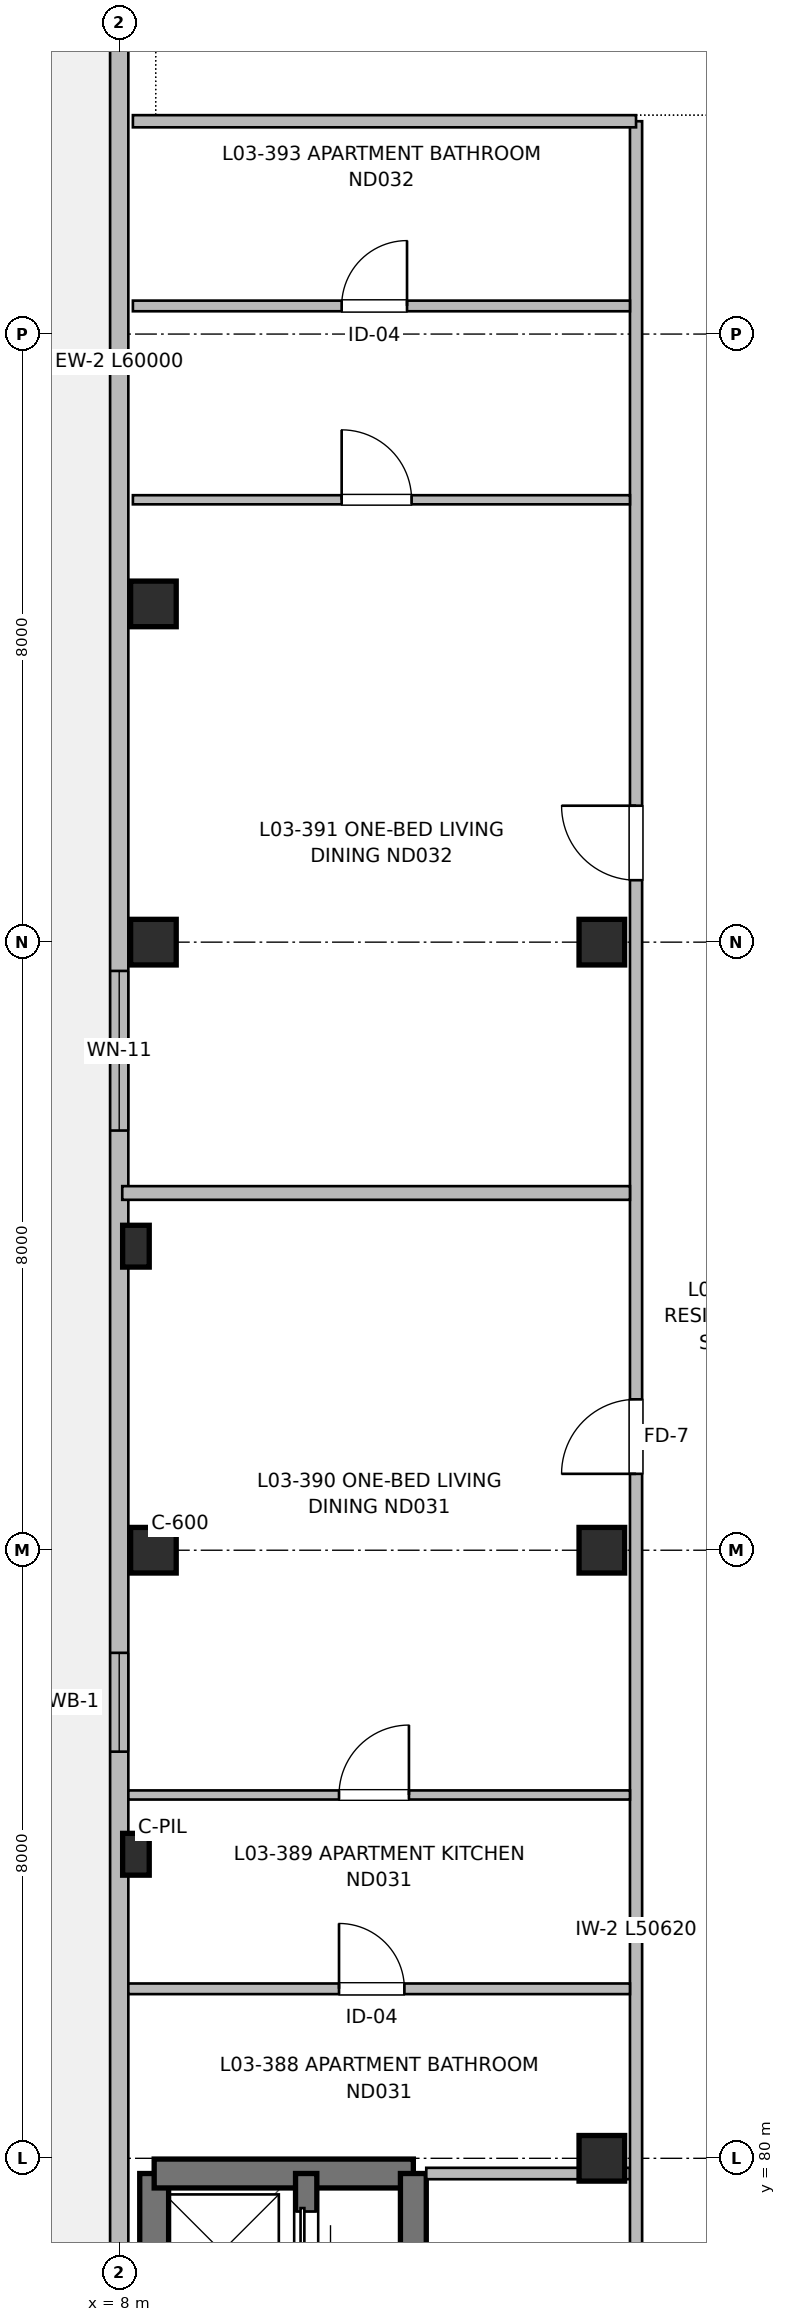
"""IFC4 building model, lengths in metres.
Left out: names, types, materials, properties, quantities, classifications, styles, units other than length and angle.
Written with IfcOpenShell. Run it as: python <this file> out.ifc"""

import sys

from ifc_helpers import new_model, si_unit, direction, frame, frame_2d, origin, origin_2d, place, context, subcontext, project, spatial, rectangle, extrude, element, fill, save


model = new_model("IFC4")
c1 = context("Model", 3, precision=1e-05, world=origin(), true_north=direction((0.0, 1.0)))
c2 = subcontext(c1, "Body", "Model", "MODEL_VIEW")
j1 = project(units=[si_unit("LENGTHUNIT", "METRE"), si_unit("PLANEANGLEUNIT", "RADIAN")], contexts=[c1])
p1 = place(None, origin())
s1 = spatial("IfcSite", under=j1, at=p1, CompositionType="ELEMENT")
p2 = place(p1, origin())
s2 = spatial("IfcBuilding", under=s1, at=p2, CompositionType="ELEMENT")
p3 = place(p2, frame((0.0, 0.0, 10.56)))
s3 = spatial("IfcBuildingStorey", under=s2, at=p3, CompositionType="ELEMENT", Elevation=10.56)
for number, where, z_axis, x_axis in (
    (1, (8.22, 84.0, 0.0), (0.0, 0.0, 1.0), (1.0, 0.0, 0.0)),
    (2, (8.22, 92.0, 0.0), (0.0, 0.0, 1.0), (1.0, 0.0, 0.0)),
):
    element("IfcColumn", number, at=place(p3, frame(where, z_axis=z_axis, x_axis=x_axis)), inside=s3, PredefinedType="PILASTER", context=c2, shape_type="SweptSolid", body=[
        extrude(rectangle(XDim=0.35, YDim=0.55, at=origin_2d()), origin(), (0.0, 0.0, 1.0), 3.2),
    ])
for number, where, z_axis, x_axis in (
    (3, (8.45, 88.0, 0.0), (0.0, 0.0, 1.0), (1.0, 0.0, 0.0)),
    (4, (8.45, 96.0, 0.0), (0.0, 0.0, 1.0), (1.0, 0.0, 0.0)),
    (5, (8.45, 100.45, 0.0), (0.0, 0.0, 1.0), (1.0, 0.0, 0.0)),
    (6, (14.35, 80.0, 0.0), (0.0, 0.0, 1.0), (1.0, 0.0, 0.0)),
    (7, (14.35, 88.0, 0.0), (0.0, 0.0, 1.0), (1.0, 0.0, 0.0)),
    (8, (14.35, 96.0, 0.0), (0.0, 0.0, 1.0), (1.0, 0.0, 0.0)),
):
    element("IfcColumn", number, at=place(p3, frame(where, z_axis=z_axis, x_axis=x_axis)), inside=s3, PredefinedType="COLUMN", context=c2, shape_type="SweptSolid", body=[
        extrude(rectangle(XDim=0.6, YDim=0.6, at=origin_2d()), origin(), (0.0, 0.0, 1.0), 3.2),
    ])
p4 = place(p3, frame((8.46, 67.35, 0.0), z_axis=(0.0, 0.0, 1.0), x_axis=(0.0, 1.0, 0.0)))
e9 = element("IfcWall", 9, at=p4, inside=s3, PredefinedType="SHEAR", context=c2, shape_type="SweptSolid", body=[
    extrude(rectangle(XDim=12.45, YDim=0.38, at=frame_2d((6.225, 0.0))), origin(), (0.0, 0.0, 1.0), 3.2),
])
p5 = place(p4, frame((2.2, 0.0, 0.97)))
e10 = element("IfcOpeningElement", 10, at=p5, cuts=e9, PredefinedType="OPENING", context=c2, shape_type="SweptSolid", body=[
    extrude(rectangle(XDim=0.95, YDim=1.25, at=frame_2d((0.475, 0.625))), frame((0.0, 0.2, 0.0), z_axis=(0.0, -1.0, 0.0), x_axis=(1.0, 0.0, 0.0)), (0.0, 0.0, 1.0), 0.4),
])
p6 = place(p3, frame((8.46, 79.8, 0.0), z_axis=(0.0, 0.0, 1.0), x_axis=(1.0, 0.0, 0.0)))
e11 = element("IfcWall", 11, at=p6, inside=s3, PredefinedType="SHEAR", context=c2, shape_type="SweptSolid", body=[
    extrude(rectangle(XDim=3.41, YDim=0.38, at=frame_2d((1.705, 0.0))), origin(), (0.0, 0.0, 1.0), 3.2),
])
p7 = place(p3, frame((11.87, 79.8, 0.0), z_axis=(0.0, 0.0, 1.0), x_axis=(0.0, -1.0, 0.0)))
e12 = element("IfcWall", 12, at=p7, inside=s3, PredefinedType="SHEAR", context=c2, shape_type="SweptSolid", body=[
    extrude(rectangle(XDim=12.45, YDim=0.34, at=frame_2d((6.225, 0.0))), origin(), (0.0, 0.0, 1.0), 3.2),
])
p8 = place(p7, frame((10.85, 0.0, 0.0)))
e13 = element("IfcOpeningElement", 13, at=p8, cuts=e12, PredefinedType="OPENING", context=c2, shape_type="SweptSolid", body=[
    extrude(rectangle(XDim=1.05, YDim=2.15, at=frame_2d((0.525, 1.075))), frame((0.0, 0.18, 0.0), z_axis=(0.0, -1.0, 0.0), x_axis=(1.0, 0.0, 0.0)), (0.0, 0.0, 1.0), 0.36),
])
p9 = place(p3, frame((10.46, 74.55, 0.0), z_axis=(0.0, 0.0, 1.0), x_axis=(0.0, 1.0, 0.0)))
e14 = element("IfcWall", 14, at=p9, inside=s3, PredefinedType="SHEAR", context=c2, shape_type="SweptSolid", body=[
    extrude(rectangle(XDim=5.25, YDim=0.28, at=frame_2d((2.625, 0.0))), origin(), (0.0, 0.0, 1.0), 3.2),
])
p10 = place(p9, frame((1.15, 0.0, 0.0)))
e15 = element("IfcOpeningElement", 15, at=p10, cuts=e14, PredefinedType="OPENING", context=c2, shape_type="SweptSolid", body=[
    extrude(rectangle(XDim=1.0, YDim=2.15, at=frame_2d((0.5, 1.075))), frame((0.0, 0.15, 0.0), z_axis=(0.0, -1.0, 0.0), x_axis=(1.0, 0.0, 0.0)), (0.0, 0.0, 1.0), 0.3),
])
p11 = place(p9, frame((3.85, 0.0, 0.0)))
e16 = element("IfcOpeningElement", 16, at=p11, cuts=e14, PredefinedType="OPENING", context=c2, shape_type="SweptSolid", body=[
    extrude(rectangle(XDim=0.9, YDim=2.15, at=frame_2d((0.45, 1.075))), frame((0.0, 0.15, 0.0), z_axis=(0.0, -1.0, 0.0), x_axis=(1.0, 0.0, 0.0)), (0.0, 0.0, 1.0), 0.3),
])
p12 = place(p3, frame((8.0, 56.0, 0.0), z_axis=(0.0, 0.0, 1.0), x_axis=(0.0, 1.0, 0.0)))
e17 = element("IfcWall", 17, at=p12, inside=s3, PredefinedType="SOLIDWALL", context=c2, shape_type="SweptSolid", body=[
    extrude(rectangle(XDim=60.0, YDim=0.24, at=frame_2d((30.0, 0.0))), origin(), (0.0, 0.0, 1.0), 2.98),
])
p13 = place(p12, frame((4.886, 0.0, 0.0)))
e18 = element("IfcOpeningElement", 18, at=p13, cuts=e17, PredefinedType="OPENING", context=c2, shape_type="SweptSolid", body=[
    extrude(rectangle(XDim=1.2, YDim=2.2, at=frame_2d((0.6, 1.1))), frame((0.0, 0.13, 0.0), z_axis=(0.0, -1.0, 0.0), x_axis=(1.0, 0.0, 0.0)), (0.0, 0.0, 1.0), 0.26),
])
p14 = place(p12, frame((12.157, 0.0, 0.87)))
e19 = element("IfcOpeningElement", 19, at=p14, cuts=e17, PredefinedType="OPENING", context=c2, shape_type="SweptSolid", body=[
    extrude(rectangle(XDim=1.4, YDim=1.35, at=frame_2d((0.7, 0.675))), frame((0.0, 0.13, 0.0), z_axis=(0.0, -1.0, 0.0), x_axis=(1.0, 0.0, 0.0)), (0.0, 0.0, 1.0), 0.26),
])
p15 = place(p12, frame((20.354, 0.0, 0.87)))
e20 = element("IfcOpeningElement", 20, at=p15, cuts=e17, PredefinedType="OPENING", context=c2, shape_type="SweptSolid", body=[
    extrude(rectangle(XDim=1.25, YDim=1.35, at=frame_2d((0.625, 0.675))), frame((0.0, 0.13, 0.0), z_axis=(0.0, -1.0, 0.0), x_axis=(1.0, 0.0, 0.0)), (0.0, 0.0, 1.0), 0.26),
])
p16 = place(p12, frame((29.35, 0.0, 0.82)))
e21 = element("IfcOpeningElement", 21, at=p16, cuts=e17, PredefinedType="OPENING", context=c2, shape_type="SweptSolid", body=[
    extrude(rectangle(XDim=1.3, YDim=1.4, at=frame_2d((0.65, 0.7))), frame((0.0, 0.13, 0.0), z_axis=(0.0, -1.0, 0.0), x_axis=(1.0, 0.0, 0.0)), (0.0, 0.0, 1.0), 0.26),
])
p17 = place(p12, frame((37.521, 0.0, 0.67)))
e22 = element("IfcOpeningElement", 22, at=p17, cuts=e17, PredefinedType="OPENING", context=c2, shape_type="SweptSolid", body=[
    extrude(rectangle(XDim=2.1, YDim=1.55, at=frame_2d((1.05, 0.775))), frame((0.0, 0.13, 0.0), z_axis=(0.0, -1.0, 0.0), x_axis=(1.0, 0.0, 0.0)), (0.0, 0.0, 1.0), 0.26),
])
p18 = place(p12, frame((55.639, 0.0, 0.9)))
e23 = element("IfcOpeningElement", 23, at=p18, cuts=e17, PredefinedType="OPENING", context=c2, shape_type="SweptSolid", body=[
    extrude(rectangle(XDim=1.05, YDim=1.15, at=frame_2d((0.525, 0.575))), frame((0.0, 0.13, 0.0), z_axis=(0.0, -1.0, 0.0), x_axis=(1.0, 0.0, 0.0)), (0.0, 0.0, 1.0), 0.26),
])
p19 = place(p3, frame((12.04, 79.8, 0.0), z_axis=(0.0, 0.0, 1.0), x_axis=(1.0, 0.0, 0.0)))
e24 = element("IfcWall", 24, at=p19, inside=s3, PredefinedType="PARTITIONING", context=c2, shape_type="SweptSolid", body=[
    extrude(rectangle(XDim=2.68, YDim=0.15, at=frame_2d((1.34, 0.0))), origin(), (0.0, 0.0, 1.0), 2.935),
])
p20 = place(p3, frame((14.8, 56.18, 0.0), z_axis=(0.0, 0.0, 1.0), x_axis=(0.0, 1.0, 0.0)))
e25 = element("IfcWall", 25, at=p20, inside=s3, PredefinedType="PARTITIONING", context=c2, shape_type="SweptSolid", body=[
    extrude(rectangle(XDim=50.62, YDim=0.16, at=frame_2d((25.31, 0.0))), origin(), (0.0, 0.0, 1.0), 2.935),
])
p21 = place(p20, frame((12.82, 0.0, 0.0)))
e26 = element("IfcOpeningElement", 26, at=p21, cuts=e25, PredefinedType="OPENING", context=c2, shape_type="SweptSolid", body=[
    extrude(rectangle(XDim=1.1, YDim=2.15, at=frame_2d((0.55, 1.075))), frame((0.0, 0.09, 0.0), z_axis=(0.0, -1.0, 0.0), x_axis=(1.0, 0.0, 0.0)), (0.0, 0.0, 1.0), 0.18),
])
p22 = place(p20, frame((19.22, 0.0, 0.0)))
e27 = element("IfcOpeningElement", 27, at=p22, cuts=e25, PredefinedType="OPENING", context=c2, shape_type="SweptSolid", body=[
    extrude(rectangle(XDim=1.6, YDim=2.15, at=frame_2d((0.8, 1.075))), frame((0.0, 0.09, 0.0), z_axis=(0.0, -1.0, 0.0), x_axis=(1.0, 0.0, 0.0)), (0.0, 0.0, 1.0), 0.18),
])
p23 = place(p20, frame((1.8, 0.0, 0.0)))
e28 = element("IfcOpeningElement", 28, at=p23, cuts=e25, PredefinedType="OPENING", context=c2, shape_type="SweptSolid", body=[
    extrude(rectangle(XDim=0.96, YDim=2.15, at=frame_2d((0.48, 1.075))), frame((0.0, 0.09, 0.0), z_axis=(0.0, -1.0, 0.0), x_axis=(1.0, 0.0, 0.0)), (0.0, 0.0, 1.0), 0.18),
])
p24 = place(p20, frame((32.825, 0.0, 0.0)))
e29 = element("IfcOpeningElement", 29, at=p24, cuts=e25, PredefinedType="OPENING", context=c2, shape_type="SweptSolid", body=[
    extrude(rectangle(XDim=0.98, YDim=2.15, at=frame_2d((0.49, 1.075))), frame((0.0, 0.09, 0.0), z_axis=(0.0, -1.0, 0.0), x_axis=(1.0, 0.0, 0.0)), (0.0, 0.0, 1.0), 0.18),
])
p25 = place(p20, frame((40.635, 0.0, 0.0)))
e30 = element("IfcOpeningElement", 30, at=p25, cuts=e25, PredefinedType="OPENING", context=c2, shape_type="SweptSolid", body=[
    extrude(rectangle(XDim=0.98, YDim=2.15, at=frame_2d((0.49, 1.075))), frame((0.0, 0.09, 0.0), z_axis=(0.0, -1.0, 0.0), x_axis=(1.0, 0.0, 0.0)), (0.0, 0.0, 1.0), 0.18),
])
p26 = place(p3, frame((8.18, 106.8, 0.0), z_axis=(0.0, 0.0, 1.0), x_axis=(1.0, 0.0, 0.0)))
e31 = element("IfcWall", 31, at=p26, inside=s3, PredefinedType="PARTITIONING", context=c2, shape_type="SweptSolid", body=[
    extrude(rectangle(XDim=6.62, YDim=0.16, at=frame_2d((3.31, 0.0))), origin(), (0.0, 0.0, 1.0), 2.935),
])
p27 = place(p3, frame((8.04, 92.7, 0.0), z_axis=(0.0, 0.0, 1.0), x_axis=(1.0, 0.0, 0.0)))
e32 = element("IfcWall", 32, at=p27, inside=s3, PredefinedType="PARTITIONING", context=c2, shape_type="SweptSolid", body=[
    extrude(rectangle(XDim=6.68, YDim=0.18, at=frame_2d((3.34, 0.0))), origin(), (0.0, 0.0, 1.0), 2.935),
])
p28 = place(p3, frame((8.12, 82.23, 0.0), z_axis=(0.0, 0.0, 1.0), x_axis=(1.0, 0.0, 0.0)))
e33 = element("IfcWall", 33, at=p28, inside=s3, PredefinedType="PARTITIONING", context=c2, shape_type="SweptSolid", body=[
    extrude(rectangle(XDim=6.6, YDim=0.14, at=frame_2d((3.3, 0.0))), origin(), (0.0, 0.0, 1.0), 2.935),
])
p29 = place(p28, frame((2.772, 0.0, 0.0)))
e34 = element("IfcOpeningElement", 34, at=p29, cuts=e33, PredefinedType="OPENING", context=c2, shape_type="SweptSolid", body=[
    extrude(rectangle(XDim=0.86, YDim=2.1, at=frame_2d((0.43, 1.05))), frame((0.0, 0.08, 0.0), z_axis=(0.0, -1.0, 0.0), x_axis=(1.0, 0.0, 0.0)), (0.0, 0.0, 1.0), 0.16),
])
p30 = place(p3, frame((8.12, 84.78, 0.0), z_axis=(0.0, 0.0, 1.0), x_axis=(1.0, 0.0, 0.0)))
e35 = element("IfcWall", 35, at=p30, inside=s3, PredefinedType="PARTITIONING", context=c2, shape_type="SweptSolid", body=[
    extrude(rectangle(XDim=6.6, YDim=0.12, at=frame_2d((3.3, 0.0))), origin(), (0.0, 0.0, 1.0), 2.935),
])
p31 = place(p30, frame((2.772, 0.0, 0.0)))
e36 = element("IfcOpeningElement", 36, at=p31, cuts=e35, PredefinedType="OPENING", context=c2, shape_type="SweptSolid", body=[
    extrude(rectangle(XDim=0.92, YDim=2.1, at=frame_2d((0.46, 1.05))), frame((0.0, 0.07, 0.0), z_axis=(0.0, -1.0, 0.0), x_axis=(1.0, 0.0, 0.0)), (0.0, 0.0, 1.0), 0.14),
])
p32 = place(p3, frame((8.18, 101.82, 0.0), z_axis=(0.0, 0.0, 1.0), x_axis=(1.0, 0.0, 0.0)))
e37 = element("IfcWall", 37, at=p32, inside=s3, PredefinedType="PARTITIONING", context=c2, shape_type="SweptSolid", body=[
    extrude(rectangle(XDim=6.54, YDim=0.12, at=frame_2d((3.27, 0.0))), origin(), (0.0, 0.0, 1.0), 2.935),
])
p33 = place(p32, frame((2.747, 0.0, 0.0)))
e38 = element("IfcOpeningElement", 38, at=p33, cuts=e37, PredefinedType="OPENING", context=c2, shape_type="SweptSolid", body=[
    extrude(rectangle(XDim=0.92, YDim=2.1, at=frame_2d((0.46, 1.05))), frame((0.0, 0.07, 0.0), z_axis=(0.0, -1.0, 0.0), x_axis=(1.0, 0.0, 0.0)), (0.0, 0.0, 1.0), 0.14),
])
p34 = place(p3, frame((8.18, 104.37, 0.0), z_axis=(0.0, 0.0, 1.0), x_axis=(1.0, 0.0, 0.0)))
e39 = element("IfcWall", 39, at=p34, inside=s3, PredefinedType="PARTITIONING", context=c2, shape_type="SweptSolid", body=[
    extrude(rectangle(XDim=6.54, YDim=0.14, at=frame_2d((3.27, 0.0))), origin(), (0.0, 0.0, 1.0), 2.935),
])
p35 = place(p34, frame((2.747, 0.0, 0.0)))
e40 = element("IfcOpeningElement", 40, at=p35, cuts=e39, PredefinedType="OPENING", context=c2, shape_type="SweptSolid", body=[
    extrude(rectangle(XDim=0.86, YDim=2.1, at=frame_2d((0.43, 1.05))), frame((0.0, 0.08, 0.0), z_axis=(0.0, -1.0, 0.0), x_axis=(1.0, 0.0, 0.0)), (0.0, 0.0, 1.0), 0.16),
])
p36 = place(p11, origin())
e41 = element("IfcDoor", 41, at=p36, inside=s3, OperationType="SLIDING_TO_RIGHT", PredefinedType="DOOR", context=c2, shape_type="SweptSolid", body=[
    extrude(rectangle(XDim=0.9, YDim=2.15, at=frame_2d((0.45, 1.075))), frame((0.0, 0.025, 0.0), z_axis=(0.0, -1.0, 0.0), x_axis=(1.0, 0.0, 0.0)), (0.0, 0.0, 1.0), 0.05),
])
fill(e16, e41)
p37 = place(p16, origin())
e42 = element("IfcWindow", 42, at=p37, inside=s3, PartitioningType="SINGLE_PANEL", PredefinedType="WINDOW", context=c2, shape_type="SweptSolid", body=[
    extrude(rectangle(XDim=1.3, YDim=1.4, at=frame_2d((0.65, 0.7))), frame((0.0, 0.03, 0.0), z_axis=(0.0, -1.0, 0.0), x_axis=(1.0, 0.0, 0.0)), (0.0, 0.0, 1.0), 0.06),
])
fill(e21, e42)
p38 = place(p17, origin())
e43 = element("IfcWindow", 43, at=p38, inside=s3, PartitioningType="SINGLE_PANEL", PredefinedType="WINDOW", context=c2, shape_type="SweptSolid", body=[
    extrude(rectangle(XDim=2.1, YDim=1.55, at=frame_2d((1.05, 0.775))), frame((0.0, 0.03, 0.0), z_axis=(0.0, -1.0, 0.0), x_axis=(1.0, 0.0, 0.0)), (0.0, 0.0, 1.0), 0.06),
])
fill(e22, e43)
p39 = place(p29, origin())
e44 = element("IfcDoor", 44, at=p39, inside=s3, OperationType="SINGLE_SWING_LEFT", PredefinedType="DOOR", context=c2, shape_type="SweptSolid", body=[
    extrude(rectangle(XDim=0.86, YDim=2.1, at=frame_2d((0.43, 1.05))), frame((0.0, 0.025, 0.0), z_axis=(0.0, -1.0, 0.0), x_axis=(1.0, 0.0, 0.0)), (0.0, 0.0, 1.0), 0.05),
])
fill(e34, e44)
p40 = place(p31, origin())
e45 = element("IfcDoor", 45, at=p40, inside=s3, OperationType="SINGLE_SWING_RIGHT", PredefinedType="DOOR", context=c2, shape_type="SweptSolid", body=[
    extrude(rectangle(XDim=0.92, YDim=2.1, at=frame_2d((0.46, 1.05))), frame((0.0, 0.025, 0.0), z_axis=(0.0, -1.0, 0.0), x_axis=(1.0, 0.0, 0.0)), (0.0, 0.0, 1.0), 0.05),
])
fill(e36, e45)
p41 = place(p24, origin())
e46 = element("IfcDoor", 46, at=p41, inside=s3, OperationType="SINGLE_SWING_LEFT", PredefinedType="DOOR", context=c2, shape_type="SweptSolid", body=[
    extrude(rectangle(XDim=0.98, YDim=2.15, at=frame_2d((0.49, 1.075))), frame((0.0, 0.025, 0.0), z_axis=(0.0, -1.0, 0.0), x_axis=(1.0, 0.0, 0.0)), (0.0, 0.0, 1.0), 0.05),
])
fill(e29, e46)
p42 = place(p35, origin())
e47 = element("IfcDoor", 47, at=p42, inside=s3, OperationType="SINGLE_SWING_RIGHT", PredefinedType="DOOR", context=c2, shape_type="SweptSolid", body=[
    extrude(rectangle(XDim=0.86, YDim=2.1, at=frame_2d((0.43, 1.05))), frame((0.0, 0.025, 0.0), z_axis=(0.0, -1.0, 0.0), x_axis=(1.0, 0.0, 0.0)), (0.0, 0.0, 1.0), 0.05),
])
fill(e40, e47)
p43 = place(p33, origin())
e48 = element("IfcDoor", 48, at=p43, inside=s3, OperationType="SINGLE_SWING_LEFT", PredefinedType="DOOR", context=c2, shape_type="SweptSolid", body=[
    extrude(rectangle(XDim=0.92, YDim=2.1, at=frame_2d((0.46, 1.05))), frame((0.0, 0.025, 0.0), z_axis=(0.0, -1.0, 0.0), x_axis=(1.0, 0.0, 0.0)), (0.0, 0.0, 1.0), 0.05),
])
fill(e38, e48)
p44 = place(p25, origin())
e49 = element("IfcDoor", 49, at=p44, inside=s3, OperationType="SINGLE_SWING_RIGHT", PredefinedType="DOOR", context=c2, shape_type="SweptSolid", body=[
    extrude(rectangle(XDim=0.98, YDim=2.15, at=frame_2d((0.49, 1.075))), frame((0.0, 0.025, 0.0), z_axis=(0.0, -1.0, 0.0), x_axis=(1.0, 0.0, 0.0)), (0.0, 0.0, 1.0), 0.05),
])
fill(e30, e49)
save(model, sys.argv[1])
